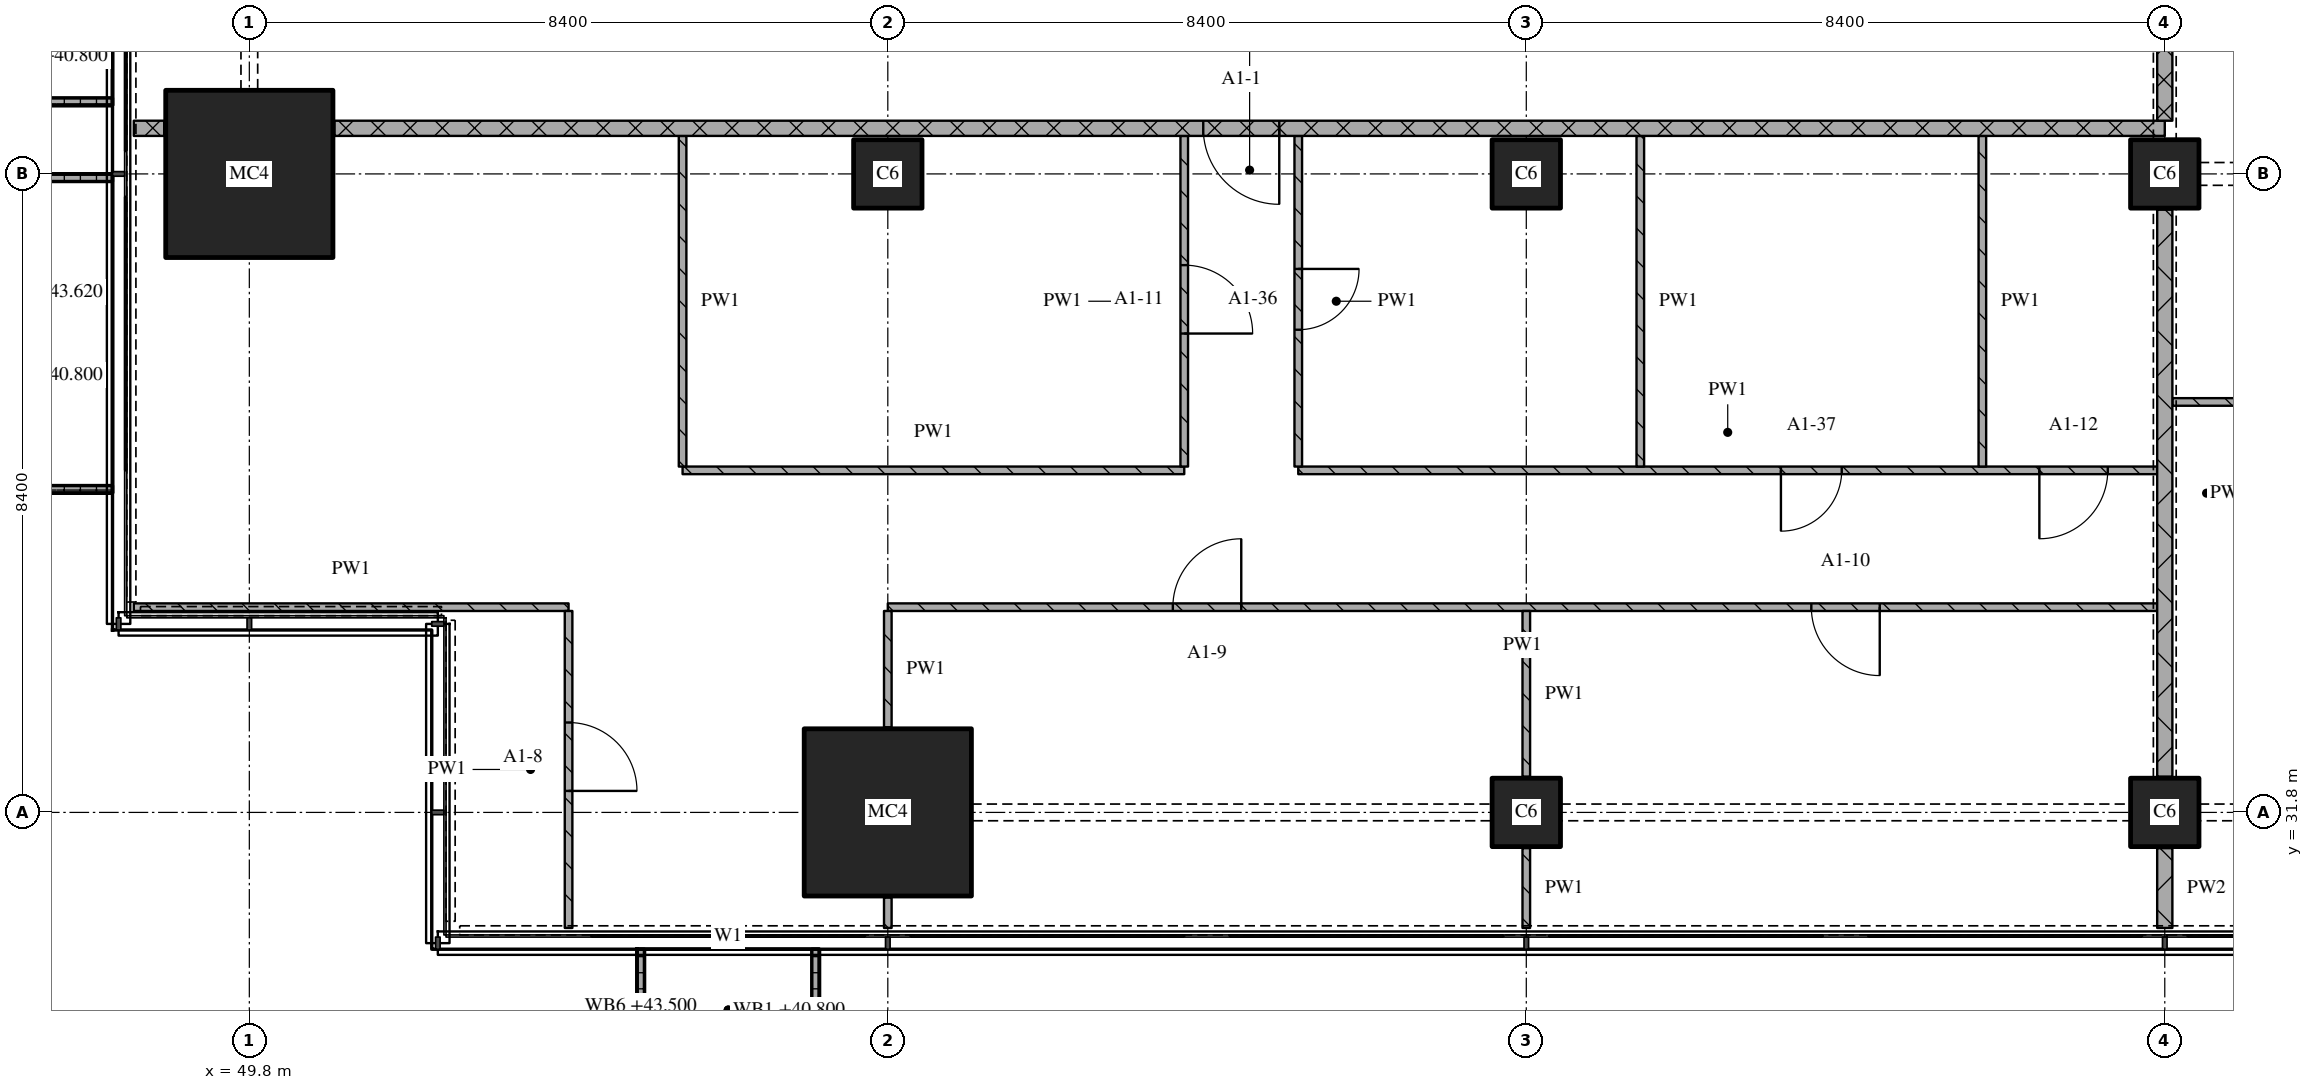
"""IFC4 building model, lengths in metres.
Left out: names, types, materials, properties, quantities, classifications, styles, units other than length and angle.
Written with IfcOpenShell. Run it as: python <this file> out.ifc"""

import sys

from ifc_helpers import new_model, si_unit, direction, frame, frame_2d, origin, origin_2d, place, context, subcontext, project, spatial, polyline, rectangle, outline, extrude, element, fill, save


model = new_model("IFC4")
c1 = context("Model", 3, precision=1e-05, world=origin(), true_north=direction((0.0, 1.0)))
c2 = subcontext(c1, "Body", "Model", "MODEL_VIEW")
j1 = project(units=[si_unit("LENGTHUNIT", "METRE"), si_unit("PLANEANGLEUNIT", "RADIAN")], contexts=[c1])
p1 = place(None, origin())
s1 = spatial("IfcSite", under=j1, at=p1, CompositionType="ELEMENT")
p2 = place(p1, origin())
s2 = spatial("IfcBuilding", under=s1, at=p2, CompositionType="ELEMENT")
p3 = place(p2, frame((0.0, 0.0, 40.8)))
s3 = spatial("IfcBuildingStorey", under=s2, at=p3, CompositionType="ELEMENT", Elevation=40.8)
for number, where, z_axis, x_axis in (
    (1, (49.8, 40.2, 0.0), (0.0, 0.0, 1.0), (1.0, 0.0, 0.0)),
    (2, (58.2, 31.8, 0.0), (0.0, 0.0, 1.0), (1.0, 0.0, 0.0)),
):
    element("IfcColumn", number, at=place(p3, frame(where, z_axis=z_axis, x_axis=x_axis)), inside=s3, PredefinedType="COLUMN", context=c2, shape_type="SweptSolid", body=[
        extrude(rectangle(XDim=2.2, YDim=2.2, at=origin_2d()), origin(), (0.0, 0.0, 1.0), 3.6),
    ])
for number, where, z_axis, x_axis in (
    (3, (58.2, 40.2, 0.0), (0.0, 0.0, 1.0), (1.0, 0.0, 0.0)),
    (4, (66.6, 31.8, 0.0), (0.0, 0.0, 1.0), (1.0, 0.0, 0.0)),
    (5, (66.6, 40.2, 0.0), (0.0, 0.0, 1.0), (1.0, 0.0, 0.0)),
    (6, (75.0, 31.8, 0.0), (0.0, 0.0, 1.0), (1.0, 0.0, 0.0)),
    (7, (75.0, 40.2, 0.0), (0.0, 0.0, 1.0), (1.0, 0.0, 0.0)),
):
    element("IfcColumn", number, at=place(p3, frame(where, z_axis=z_axis, x_axis=x_axis)), inside=s3, PredefinedType="COLUMN", context=c2, shape_type="SweptSolid", body=[
        extrude(rectangle(XDim=0.9, YDim=0.9, at=origin_2d()), origin(), (0.0, 0.0, 1.0), 3.6),
    ])
p4 = place(p3, origin())
e8 = element("IfcWall", 8, at=p4, inside=s3, PredefinedType="SOLIDWALL", context=c2, shape_type="SweptSolid", body=[
    extrude(outline(polyline([(54.9, 30.0), (55.0, 30.0), (55.0, 28.5), (57.2, 28.5), (57.2, 30.0), (57.3, 30.0), (57.3, 28.4), (54.9, 28.4), (54.9, 30.0)])), origin(), (0.0, 0.0, 1.0), 1.0),
])
p5 = place(p3, origin())
e9 = element("IfcWall", 9, at=p5, inside=s3, PredefinedType="SOLIDWALL", context=c2, shape_type="SweptSolid", body=[
    extrude(outline(polyline([(48.0, 43.5), (48.0, 43.4), (46.5, 43.4), (46.5, 41.2), (48.0, 41.2), (48.0, 41.1), (46.4, 41.1), (46.4, 43.5), (48.0, 43.5)])), origin(), (0.0, 0.0, 1.0), 1.0),
])
p6 = place(p3, origin())
e10 = element("IfcWall", 10, at=p6, inside=s3, PredefinedType="SOLIDWALL", context=c2, shape_type="SweptSolid", body=[
    extrude(outline(polyline([(48.0, 40.2), (48.0, 40.1), (46.367, 40.1), (46.367, 36.1), (48.0, 36.1), (48.0, 36.0), (46.267, 36.0), (46.267, 40.2), (48.0, 40.2)])), origin(), (0.0, 0.0, 1.0), 1.0),
])
p7 = place(p3, frame((48.28, 34.5, 0.0), z_axis=(0.0, 0.0, 1.0), x_axis=(1.0, 0.0, 0.0)))
e11 = element("IfcWall", 11, at=p7, inside=s3, PredefinedType="PARTITIONING", context=c2, shape_type="SweptSolid", body=[
    extrude(rectangle(XDim=5.72, YDim=0.1, at=frame_2d((2.86, 0.0))), origin(), (0.0, 0.0, 1.0), 3.32),
])
p8 = place(p3, frame((74.9, 34.5, 0.0), z_axis=(0.0, 0.0, 1.0), x_axis=(-1.0, 0.0, 0.0)))
e12 = element("IfcWall", 12, at=p8, inside=s3, PredefinedType="PARTITIONING", context=c2, shape_type="SweptSolid", body=[
    extrude(rectangle(XDim=16.7, YDim=0.1, at=frame_2d((8.35, 0.0))), origin(), (0.0, 0.0, 1.0), 3.32),
])
p9 = place(p8, frame((3.65, 0.0, 0.0)))
e13 = element("IfcOpeningElement", 13, at=p9, cuts=e12, PredefinedType="OPENING", context=c2, shape_type="SweptSolid", body=[
    extrude(rectangle(XDim=0.9, YDim=2.1, at=frame_2d((0.45, 1.05))), frame((0.0, 0.06, 0.0), z_axis=(0.0, -1.0, 0.0), x_axis=(1.0, 0.0, 0.0)), (0.0, 0.0, 1.0), 0.12),
])
p10 = place(p8, frame((12.05, 0.0, 0.0)))
e14 = element("IfcOpeningElement", 14, at=p10, cuts=e12, PredefinedType="OPENING", context=c2, shape_type="SweptSolid", body=[
    extrude(rectangle(XDim=0.9, YDim=2.1, at=frame_2d((0.45, 1.05))), frame((0.0, 0.06, 0.0), z_axis=(0.0, -1.0, 0.0), x_axis=(1.0, 0.0, 0.0)), (0.0, 0.0, 1.0), 0.12),
])
p11 = place(p3, frame((55.5, 36.3, 0.0), z_axis=(0.0, 0.0, 1.0), x_axis=(1.0, 0.0, 0.0)))
e15 = element("IfcWall", 15, at=p11, inside=s3, PredefinedType="PARTITIONING", context=c2, shape_type="SweptSolid", body=[
    extrude(rectangle(XDim=6.6, YDim=0.1, at=frame_2d((3.3, 0.0))), origin(), (0.0, 0.0, 1.0), 3.32),
])
p12 = place(p3, frame((63.6, 36.3, 0.0), z_axis=(0.0, 0.0, 1.0), x_axis=(1.0, 0.0, 0.0)))
e16 = element("IfcWall", 16, at=p12, inside=s3, PredefinedType="PARTITIONING", context=c2, shape_type="SweptSolid", body=[
    extrude(rectangle(XDim=11.3, YDim=0.1, at=frame_2d((5.65, 0.0))), origin(), (0.0, 0.0, 1.0), 3.32),
])
p13 = place(p12, frame((6.35, 0.0, 0.0)))
e17 = element("IfcOpeningElement", 17, at=p13, cuts=e16, PredefinedType="OPENING", context=c2, shape_type="SweptSolid", body=[
    extrude(rectangle(XDim=0.8, YDim=2.1, at=frame_2d((0.4, 1.05))), frame((0.0, 0.06, 0.0), z_axis=(0.0, -1.0, 0.0), x_axis=(1.0, 0.0, 0.0)), (0.0, 0.0, 1.0), 0.12),
])
p14 = place(p12, frame((9.75, 0.0, 0.0)))
e18 = element("IfcOpeningElement", 18, at=p14, cuts=e16, PredefinedType="OPENING", context=c2, shape_type="SweptSolid", body=[
    extrude(rectangle(XDim=0.9, YDim=2.1, at=frame_2d((0.45, 1.05))), frame((0.0, 0.06, 0.0), z_axis=(0.0, -1.0, 0.0), x_axis=(1.0, 0.0, 0.0)), (0.0, 0.0, 1.0), 0.12),
])
p15 = place(p3, frame((87.6, 37.2, 0.0), z_axis=(0.0, 0.0, 1.0), x_axis=(-1.0, 0.0, 0.0)))
e19 = element("IfcWall", 19, at=p15, inside=s3, PredefinedType="PARTITIONING", context=c2, shape_type="SweptSolid", body=[
    extrude(rectangle(XDim=12.5, YDim=0.1, at=frame_2d((6.25, 0.0))), origin(), (0.0, 0.0, 1.0), 3.32),
])
p16 = place(p15, frame((5.85, 0.0, 0.0)))
e20 = element("IfcOpeningElement", 20, at=p16, cuts=e19, PredefinedType="OPENING", context=c2, shape_type="SweptSolid", body=[
    extrude(rectangle(XDim=0.9, YDim=2.1, at=frame_2d((0.45, 1.05))), frame((0.0, 0.06, 0.0), z_axis=(0.0, -1.0, 0.0), x_axis=(1.0, 0.0, 0.0)), (0.0, 0.0, 1.0), 0.12),
])
p17 = place(p15, frame((10.05, 0.0, 0.0)))
e21 = element("IfcOpeningElement", 21, at=p17, cuts=e19, PredefinedType="OPENING", context=c2, shape_type="SweptSolid", body=[
    extrude(rectangle(XDim=0.9, YDim=2.1, at=frame_2d((0.45, 1.05))), frame((0.0, 0.06, 0.0), z_axis=(0.0, -1.0, 0.0), x_axis=(1.0, 0.0, 0.0)), (0.0, 0.0, 1.0), 0.12),
])
p18 = place(p3, frame((48.28, 40.8, 0.0), z_axis=(0.0, 0.0, 1.0), x_axis=(1.0, 0.0, 0.0)))
e22 = element("IfcWall", 22, at=p18, inside=s3, PredefinedType="PARTITIONING", context=c2, shape_type="SweptSolid", body=[
    extrude(rectangle(XDim=0.4, YDim=0.2, at=frame_2d((0.2, 0.0))), origin(), (0.0, 0.0, 1.0), 3.32),
])
p19 = place(p3, frame((75.0, 40.8, 0.0), z_axis=(0.0, 0.0, 1.0), x_axis=(-1.0, 0.0, 0.0)))
e23 = element("IfcWall", 23, at=p19, inside=s3, PredefinedType="PARTITIONING", context=c2, shape_type="SweptSolid", body=[
    extrude(rectangle(XDim=24.08, YDim=0.2, at=frame_2d((12.04, 0.0))), origin(), (0.0, 0.0, 1.0), 3.32),
])
p20 = place(p19, frame((11.65, 0.0, 0.0)))
e24 = element("IfcOpeningElement", 24, at=p20, cuts=e23, PredefinedType="OPENING", context=c2, shape_type="SweptSolid", body=[
    extrude(rectangle(XDim=1.0, YDim=2.1, at=frame_2d((0.5, 1.05))), frame((0.0, 0.11, 0.0), z_axis=(0.0, -1.0, 0.0), x_axis=(1.0, 0.0, 0.0)), (0.0, 0.0, 1.0), 0.22),
])
p21 = place(p3, frame((54.0, 30.28, 0.0), z_axis=(0.0, 0.0, 1.0), x_axis=(0.0, 1.0, 0.0)))
e25 = element("IfcWall", 25, at=p21, inside=s3, PredefinedType="PARTITIONING", context=c2, shape_type="SweptSolid", body=[
    extrude(rectangle(XDim=4.17, YDim=0.1, at=frame_2d((2.085, 0.0))), origin(), (0.0, 0.0, 1.0), 3.32),
])
p22 = place(p21, frame((1.803, 0.0, 0.0)))
e26 = element("IfcOpeningElement", 26, at=p22, cuts=e25, PredefinedType="OPENING", context=c2, shape_type="SweptSolid", body=[
    extrude(rectangle(XDim=0.9, YDim=2.1, at=frame_2d((0.45, 1.05))), frame((0.0, 0.06, 0.0), z_axis=(0.0, -1.0, 0.0), x_axis=(1.0, 0.0, 0.0)), (0.0, 0.0, 1.0), 0.12),
])
p23 = place(p3, frame((55.5, 40.7, 0.0), z_axis=(0.0, 0.0, 1.0), x_axis=(0.0, -1.0, 0.0)))
e27 = element("IfcWall", 27, at=p23, inside=s3, PredefinedType="PARTITIONING", context=c2, shape_type="SweptSolid", body=[
    extrude(rectangle(XDim=4.35, YDim=0.1, at=frame_2d((2.175, 0.0))), origin(), (0.0, 0.0, 1.0), 3.32),
])
p24 = place(p3, frame((58.2, 30.68, 0.0), z_axis=(0.0, 0.0, 1.0), x_axis=(0.0, -1.0, 0.0)))
e28 = element("IfcWall", 28, at=p24, inside=s3, PredefinedType="PARTITIONING", context=c2, shape_type="SweptSolid", body=[
    extrude(rectangle(XDim=0.4, YDim=0.1, at=frame_2d((0.2, 0.0))), origin(), (0.0, 0.0, 1.0), 3.32),
])
p25 = place(p3, frame((58.2, 34.45, 0.0), z_axis=(0.0, 0.0, 1.0), x_axis=(0.0, -1.0, 0.0)))
e29 = element("IfcWall", 29, at=p25, inside=s3, PredefinedType="PARTITIONING", context=c2, shape_type="SweptSolid", body=[
    extrude(rectangle(XDim=1.53, YDim=0.1, at=frame_2d((0.765, 0.0))), origin(), (0.0, 0.0, 1.0), 3.32),
])
p26 = place(p3, frame((62.1, 36.35, 0.0), z_axis=(0.0, 0.0, 1.0), x_axis=(0.0, 1.0, 0.0)))
e30 = element("IfcWall", 30, at=p26, inside=s3, PredefinedType="PARTITIONING", context=c2, shape_type="SweptSolid", body=[
    extrude(rectangle(XDim=4.35, YDim=0.1, at=frame_2d((2.175, 0.0))), origin(), (0.0, 0.0, 1.0), 3.32),
])
p27 = place(p26, frame((1.75, 0.0, 0.0)))
e31 = element("IfcOpeningElement", 31, at=p27, cuts=e30, PredefinedType="OPENING", context=c2, shape_type="SweptSolid", body=[
    extrude(rectangle(XDim=0.9, YDim=2.1, at=frame_2d((0.45, 1.05))), frame((0.0, 0.06, 0.0), z_axis=(0.0, -1.0, 0.0), x_axis=(1.0, 0.0, 0.0)), (0.0, 0.0, 1.0), 0.12),
])
p28 = place(p3, frame((63.6, 40.7, 0.0), z_axis=(0.0, 0.0, 1.0), x_axis=(0.0, -1.0, 0.0)))
e32 = element("IfcWall", 32, at=p28, inside=s3, PredefinedType="PARTITIONING", context=c2, shape_type="SweptSolid", body=[
    extrude(rectangle(XDim=4.35, YDim=0.1, at=frame_2d((2.175, 0.0))), origin(), (0.0, 0.0, 1.0), 3.32),
])
p29 = place(p28, frame((1.75, 0.0, 0.0)))
e33 = element("IfcOpeningElement", 33, at=p29, cuts=e32, PredefinedType="OPENING", context=c2, shape_type="SweptSolid", body=[
    extrude(rectangle(XDim=0.8, YDim=2.1, at=frame_2d((0.4, 1.05))), frame((0.0, 0.06, 0.0), z_axis=(0.0, -1.0, 0.0), x_axis=(1.0, 0.0, 0.0)), (0.0, 0.0, 1.0), 0.12),
])
p30 = place(p3, frame((66.6, 31.33, 0.0), z_axis=(0.0, 0.0, 1.0), x_axis=(0.0, -1.0, 0.0)))
e34 = element("IfcWall", 34, at=p30, inside=s3, PredefinedType="PARTITIONING", context=c2, shape_type="SweptSolid", body=[
    extrude(rectangle(XDim=1.05, YDim=0.1, at=frame_2d((0.525, 0.0))), origin(), (0.0, 0.0, 1.0), 3.32),
])
p31 = place(p3, frame((66.6, 34.45, 0.0), z_axis=(0.0, 0.0, 1.0), x_axis=(0.0, -1.0, 0.0)))
e35 = element("IfcWall", 35, at=p31, inside=s3, PredefinedType="PARTITIONING", context=c2, shape_type="SweptSolid", body=[
    extrude(rectangle(XDim=2.18, YDim=0.1, at=frame_2d((1.09, 0.0))), origin(), (0.0, 0.0, 1.0), 3.32),
])
for number, where, z_axis, x_axis in (
    (36, (68.1, 40.7, 0.0), (0.0, 0.0, 1.0), (0.0, -1.0, 0.0)),
    (37, (72.6, 40.7, 0.0), (0.0, 0.0, 1.0), (0.0, -1.0, 0.0)),
):
    element("IfcWall", number, at=place(p3, frame(where, z_axis=z_axis, x_axis=x_axis)), inside=s3, PredefinedType="PARTITIONING", context=c2, shape_type="SweptSolid", body=[
        extrude(rectangle(XDim=4.35, YDim=0.1, at=frame_2d((2.175, 0.0))), origin(), (0.0, 0.0, 1.0), 3.32),
    ])
p32 = place(p3, frame((75.0, 43.1, 0.0), z_axis=(0.0, 0.0, 1.0), x_axis=(0.0, -1.0, 0.0)))
e38 = element("IfcWall", 38, at=p32, inside=s3, PredefinedType="PARTITIONING", context=c2, shape_type="SweptSolid", body=[
    extrude(rectangle(XDim=2.2, YDim=0.2, at=frame_2d((1.1, 0.0))), origin(), (0.0, 0.0, 1.0), 2.43),
])
p33 = place(p3, frame((75.0, 31.33, 0.0), z_axis=(0.0, 0.0, 1.0), x_axis=(0.0, -1.0, 0.0)))
e39 = element("IfcWall", 39, at=p33, inside=s3, PredefinedType="PARTITIONING", context=c2, shape_type="SweptSolid", body=[
    extrude(rectangle(XDim=1.05, YDim=0.2, at=frame_2d((0.525, 0.0))), origin(), (0.0, 0.0, 1.0), 3.32),
])
p34 = place(p3, frame((75.0, 39.73, 0.0), z_axis=(0.0, 0.0, 1.0), x_axis=(0.0, -1.0, 0.0)))
e40 = element("IfcWall", 40, at=p34, inside=s3, PredefinedType="PARTITIONING", context=c2, shape_type="SweptSolid", body=[
    extrude(rectangle(XDim=7.46, YDim=0.2, at=frame_2d((3.73, 0.0))), origin(), (0.0, 0.0, 1.0), 2.83),
])
p35 = place(p9, origin())
e41 = element("IfcDoor", 41, at=p35, inside=s3, OperationType="SINGLE_SWING_LEFT", PredefinedType="DOOR", context=c2, shape_type="SweptSolid", body=[
    extrude(rectangle(XDim=0.9, YDim=2.1, at=frame_2d((0.45, 1.05))), frame((0.0, 0.025, 0.0), z_axis=(0.0, -1.0, 0.0), x_axis=(1.0, 0.0, 0.0)), (0.0, 0.0, 1.0), 0.05),
])
fill(e13, e41)
p36 = place(p10, origin())
e42 = element("IfcDoor", 42, at=p36, inside=s3, OperationType="SINGLE_SWING_RIGHT", PredefinedType="DOOR", context=c2, shape_type="SweptSolid", body=[
    extrude(rectangle(XDim=0.9, YDim=2.1, at=frame_2d((0.45, 1.05))), frame((0.0, 0.025, 0.0), z_axis=(0.0, -1.0, 0.0), x_axis=(1.0, 0.0, 0.0)), (0.0, 0.0, 1.0), 0.05),
])
fill(e14, e42)
p37 = place(p13, origin())
e43 = element("IfcDoor", 43, at=p37, inside=s3, OperationType="SINGLE_SWING_RIGHT", PredefinedType="DOOR", context=c2, shape_type="SweptSolid", body=[
    extrude(rectangle(XDim=0.8, YDim=2.1, at=frame_2d((0.4, 1.05))), frame((0.0, 0.025, 0.0), z_axis=(0.0, -1.0, 0.0), x_axis=(1.0, 0.0, 0.0)), (0.0, 0.0, 1.0), 0.05),
])
fill(e17, e43)
p38 = place(p14, origin())
e44 = element("IfcDoor", 44, at=p38, inside=s3, OperationType="SINGLE_SWING_RIGHT", PredefinedType="DOOR", context=c2, shape_type="SweptSolid", body=[
    extrude(rectangle(XDim=0.9, YDim=2.1, at=frame_2d((0.45, 1.05))), frame((0.0, 0.025, 0.0), z_axis=(0.0, -1.0, 0.0), x_axis=(1.0, 0.0, 0.0)), (0.0, 0.0, 1.0), 0.05),
])
fill(e18, e44)
p39 = place(p20, origin())
e45 = element("IfcDoor", 45, at=p39, inside=s3, OperationType="SINGLE_SWING_LEFT", PredefinedType="DOOR", context=c2, shape_type="SweptSolid", body=[
    extrude(rectangle(XDim=1.0, YDim=2.1, at=frame_2d((0.5, 1.05))), frame((0.0, 0.025, 0.0), z_axis=(0.0, -1.0, 0.0), x_axis=(1.0, 0.0, 0.0)), (0.0, 0.0, 1.0), 0.05),
])
fill(e24, e45)
p40 = place(p22, origin())
e46 = element("IfcDoor", 46, at=p40, inside=s3, OperationType="SINGLE_SWING_RIGHT", PredefinedType="DOOR", context=c2, shape_type="SweptSolid", body=[
    extrude(rectangle(XDim=0.9, YDim=2.1, at=frame_2d((0.45, 1.05))), frame((0.0, 0.025, 0.0), z_axis=(0.0, -1.0, 0.0), x_axis=(1.0, 0.0, 0.0)), (0.0, 0.0, 1.0), 0.05),
])
fill(e26, e46)
p41 = place(p27, origin())
e47 = element("IfcDoor", 47, at=p41, inside=s3, OperationType="SINGLE_SWING_RIGHT", PredefinedType="DOOR", context=c2, shape_type="SweptSolid", body=[
    extrude(rectangle(XDim=0.9, YDim=2.1, at=frame_2d((0.45, 1.05))), frame((0.0, 0.025, 0.0), z_axis=(0.0, -1.0, 0.0), x_axis=(1.0, 0.0, 0.0)), (0.0, 0.0, 1.0), 0.05),
])
fill(e31, e47)
p42 = place(p29, origin())
e48 = element("IfcDoor", 48, at=p42, inside=s3, OperationType="SINGLE_SWING_LEFT", PredefinedType="DOOR", context=c2, shape_type="SweptSolid", body=[
    extrude(rectangle(XDim=0.8, YDim=2.1, at=frame_2d((0.4, 1.05))), frame((0.0, 0.025, 0.0), z_axis=(0.0, -1.0, 0.0), x_axis=(1.0, 0.0, 0.0)), (0.0, 0.0, 1.0), 0.05),
])
fill(e33, e48)
save(model, sys.argv[1])
